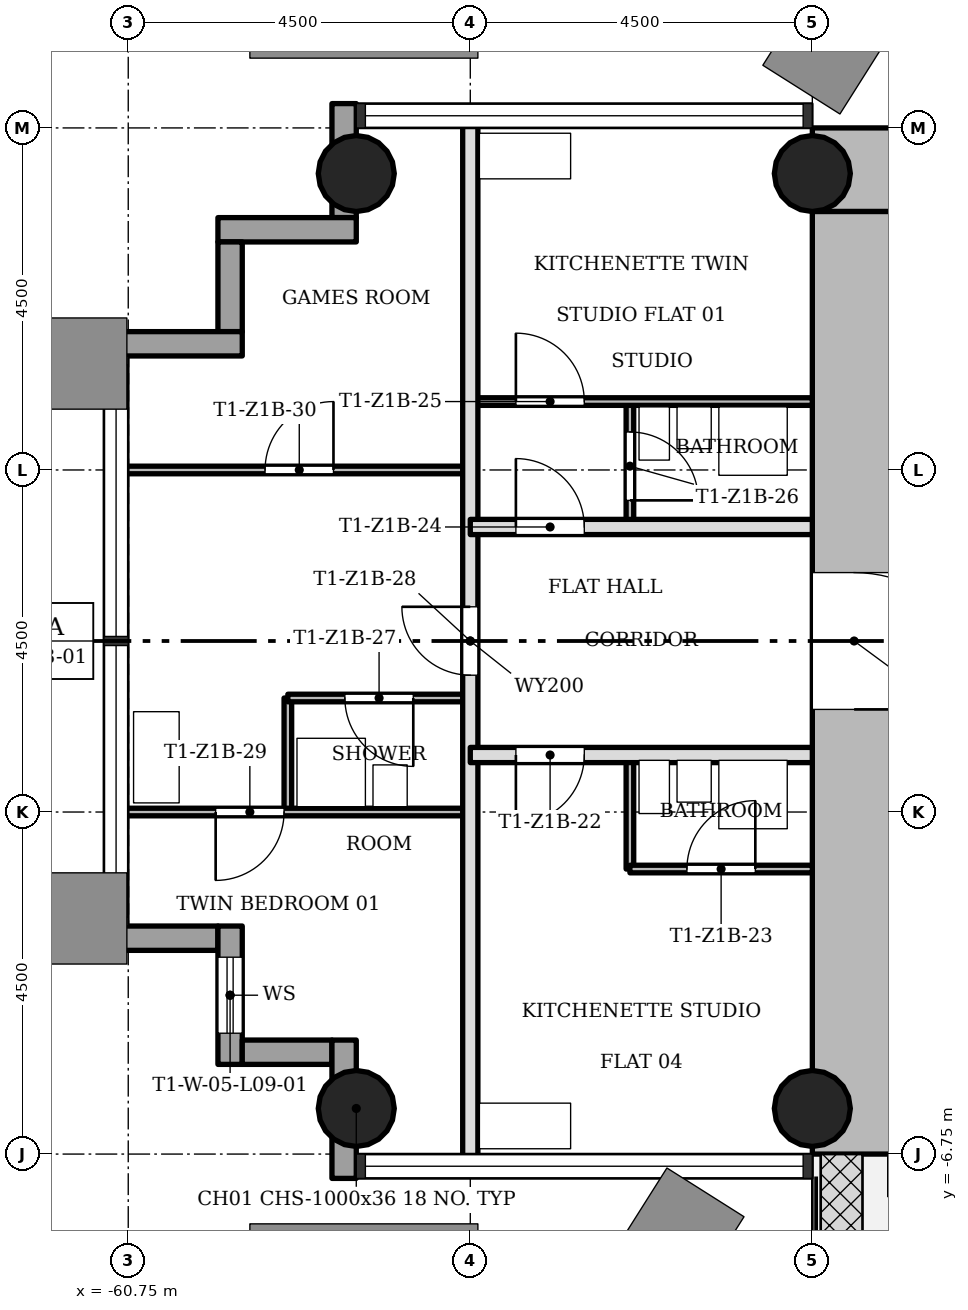
"""IFC4 building model, lengths in metres.
Left out: names, types, materials, properties, quantities, classifications, styles, units other than length and angle.
Written with IfcOpenShell. Run it as: python <this file> out.ifc"""

import sys

from ifc_helpers import new_model, si_unit, direction, frame, frame_2d, origin, origin_2d, place, context, subcontext, project, spatial, rectangle, hollow_circle, extrude, element, fill, save


model = new_model("IFC4")
c1 = context("Model", 3, precision=1e-05, world=origin(), true_north=direction((0.0, 1.0)))
c2 = subcontext(c1, "Body", "Model", "MODEL_VIEW")
j1 = project(units=[si_unit("LENGTHUNIT", "METRE"), si_unit("PLANEANGLEUNIT", "RADIAN")], contexts=[c1])
p1 = place(None, origin())
s1 = spatial("IfcSite", under=j1, at=p1, CompositionType="ELEMENT")
p2 = place(p1, origin())
s2 = spatial("IfcBuilding", under=s1, at=p2, CompositionType="ELEMENT")
p3 = place(p2, frame((0.0, 0.0, 38.1)))
s3 = spatial("IfcBuildingStorey", under=s2, at=p3, CompositionType="ELEMENT", Elevation=38.1)
p4 = place(p3, frame((-43.85, 6.2, 0.0), z_axis=(0.0, 0.0, 1.0), x_axis=(-1.0, 0.0, 0.0)))
e1 = element("IfcWall", 1, at=p4, inside=s3, PredefinedType="SHEAR", context=c2, shape_type="SweptSolid", body=[
    extrude(rectangle(XDim=7.9, YDim=1.1, at=frame_2d((3.95, 0.0))), origin(), (0.0, 0.0, 1.0), 3.4),
])
p5 = place(p3, frame((-51.2, 5.65, 0.0), z_axis=(0.0, 0.0, 1.0), x_axis=(0.0, -1.0, 0.0)))
e2 = element("IfcWall", 2, at=p5, inside=s3, PredefinedType="SHEAR", context=c2, shape_type="SweptSolid", body=[
    extrude(rectangle(XDim=12.4, YDim=1.1, at=frame_2d((6.2, 0.0))), origin(), (0.0, 0.0, 1.0), 3.4),
])
p6 = place(p5, frame((4.75, 0.0, 0.0)))
e3 = element("IfcOpeningElement", 3, at=p6, cuts=e2, PredefinedType="OPENING", context=c2, shape_type="SweptSolid", body=[
    extrude(rectangle(XDim=1.8, YDim=2.1, at=frame_2d((0.9, 1.05))), frame((0.0, 0.56, 0.0), z_axis=(0.0, -1.0, 0.0), x_axis=(1.0, 0.0, 0.0)), (0.0, 0.0, 1.0), 1.12),
])
for number, where, z_axis, x_axis in (
    (4, (-51.75, -6.15, 0.0), (0.0, 0.0, 1.0), (1.0, 0.0, 0.0)),
    (5, (-51.75, 6.15, 0.0), (0.0, 0.0, 1.0), (1.0, 0.0, 0.0)),
    (6, (-57.75, -6.15, 0.0), (0.0, 0.0, 1.0), (1.0, 0.0, 0.0)),
    (7, (-57.75, 6.15, 0.0), (0.0, 0.0, 1.0), (1.0, 0.0, 0.0)),
):
    element("IfcColumn", number, at=place(p3, frame(where, z_axis=z_axis, x_axis=x_axis)), inside=s3, PredefinedType="COLUMN", context=c2, shape_type="SweptSolid", body=[
        extrude(hollow_circle(Radius=0.5, WallThickness=0.036, at=origin_2d()), origin(), (0.0, 0.0, 1.0), 3.4),
    ])
p7 = place(p3, frame((-61.07, -3.91, -0.3), z_axis=(0.0, 0.0, 1.0), x_axis=(1.0, 0.0, 0.0)))
e8 = element("IfcWall", 8, at=p7, inside=s3, PredefinedType="STANDARD", context=c2, shape_type="SweptSolid", body=[
    extrude(rectangle(XDim=1.5, YDim=0.32, at=frame_2d((0.75, 0.0))), origin(), (0.0, 0.0, 1.0), 3.4),
])
p8 = place(p3, frame((-59.41, -3.75, -0.3), z_axis=(0.0, 0.0, 1.0), x_axis=(0.0, -1.0, 0.0)))
e9 = element("IfcWall", 9, at=p8, inside=s3, PredefinedType="STANDARD", context=c2, shape_type="SweptSolid", body=[
    extrude(rectangle(XDim=1.82, YDim=0.32, at=frame_2d((0.91, 0.0))), origin(), (0.0, 0.0, 1.0), 3.4),
])
p9 = place(p8, frame((0.41, 0.0, 1.2)))
e10 = element("IfcOpeningElement", 10, at=p9, cuts=e9, PredefinedType="OPENING", context=c2, shape_type="SweptSolid", body=[
    extrude(rectangle(XDim=1.0, YDim=1.5, at=frame_2d((0.5, 0.75))), frame((0.0, 0.17, 0.0), z_axis=(0.0, -1.0, 0.0), x_axis=(1.0, 0.0, 0.0)), (0.0, 0.0, 1.0), 0.34),
])
p10 = place(p3, frame((-59.25, -5.41, -0.3), z_axis=(0.0, 0.0, 1.0), x_axis=(1.0, 0.0, 0.0)))
e11 = element("IfcWall", 11, at=p10, inside=s3, PredefinedType="STANDARD", context=c2, shape_type="SweptSolid", body=[
    extrude(rectangle(XDim=1.18, YDim=0.32, at=frame_2d((0.59, 0.0))), origin(), (0.0, 0.0, 1.0), 3.4),
])
p11 = place(p3, frame((-57.91, -5.25, -0.3), z_axis=(0.0, 0.0, 1.0), x_axis=(0.0, -1.0, 0.0)))
e12 = element("IfcWall", 12, at=p11, inside=s3, PredefinedType="STANDARD", context=c2, shape_type="SweptSolid", body=[
    extrude(rectangle(XDim=1.82, YDim=0.32, at=frame_2d((0.91, 0.0))), origin(), (0.0, 0.0, 1.0), 3.4),
])
p12 = place(p3, frame((-57.91, 7.07, -0.3), z_axis=(0.0, 0.0, 1.0), x_axis=(0.0, -1.0, 0.0)))
e13 = element("IfcWall", 13, at=p12, inside=s3, PredefinedType="STANDARD", context=c2, shape_type="SweptSolid", body=[
    extrude(rectangle(XDim=1.5, YDim=0.32, at=frame_2d((0.75, 0.0))), origin(), (0.0, 0.0, 1.0), 3.4),
])
p13 = place(p3, frame((-57.75, 5.41, -0.3), z_axis=(0.0, 0.0, 1.0), x_axis=(-1.0, 0.0, 0.0)))
e14 = element("IfcWall", 14, at=p13, inside=s3, PredefinedType="STANDARD", context=c2, shape_type="SweptSolid", body=[
    extrude(rectangle(XDim=1.82, YDim=0.32, at=frame_2d((0.91, 0.0))), origin(), (0.0, 0.0, 1.0), 3.4),
])
p14 = place(p3, frame((-59.41, 5.25, -0.3), z_axis=(0.0, 0.0, 1.0), x_axis=(0.0, -1.0, 0.0)))
e15 = element("IfcWall", 15, at=p14, inside=s3, PredefinedType="STANDARD", context=c2, shape_type="SweptSolid", body=[
    extrude(rectangle(XDim=1.18, YDim=0.32, at=frame_2d((0.59, 0.0))), origin(), (0.0, 0.0, 1.0), 3.4),
])
p15 = place(p3, frame((-59.25, 3.91, -0.3), z_axis=(0.0, 0.0, 1.0), x_axis=(-1.0, 0.0, 0.0)))
e16 = element("IfcWall", 16, at=p15, inside=s3, PredefinedType="STANDARD", context=c2, shape_type="SweptSolid", body=[
    extrude(rectangle(XDim=1.82, YDim=0.32, at=frame_2d((0.91, 0.0))), origin(), (0.0, 0.0, 1.0), 3.4),
])
p16 = place(p3, frame((-58.65, -2.25, 0.0), z_axis=(0.0, 0.0, 1.0), x_axis=(0.0, 1.0, 0.0)))
e17 = element("IfcWall", 17, at=p16, inside=s3, PredefinedType="PARTITIONING", context=c2, shape_type="SweptSolid", body=[
    extrude(rectangle(XDim=1.5, YDim=0.1, at=frame_2d((0.75, 0.0))), origin(), (0.0, 0.0, 1.0), 3.0),
])
p17 = place(p3, frame((-56.25, -6.85, 0.0), z_axis=(0.0, 0.0, 1.0), x_axis=(0.0, 1.0, 0.0)))
e18 = element("IfcWall", 18, at=p17, inside=s3, PredefinedType="SOLIDWALL", context=c2, shape_type="SweptSolid", body=[
    extrude(rectangle(XDim=13.7, YDim=0.2, at=frame_2d((6.85, 0.0))), origin(), (0.0, 0.0, 1.0), 3.0),
])
p18 = place(p17, frame((6.4, 0.0, 0.0)))
e19 = element("IfcOpeningElement", 19, at=p18, cuts=e18, PredefinedType="OPENING", context=c2, shape_type="SweptSolid", body=[
    extrude(rectangle(XDim=0.9, YDim=2.1, at=frame_2d((0.45, 1.05))), frame((0.0, 0.11, 0.0), z_axis=(0.0, -1.0, 0.0), x_axis=(1.0, 0.0, 0.0)), (0.0, 0.0, 1.0), 0.22),
])
p19 = place(p3, frame((-54.15, -3.0, 0.0), z_axis=(0.0, 0.0, 1.0), x_axis=(0.0, 1.0, 0.0)))
e20 = element("IfcWall", 20, at=p19, inside=s3, PredefinedType="PARTITIONING", context=c2, shape_type="SweptSolid", body=[
    extrude(rectangle(XDim=1.5, YDim=0.1, at=frame_2d((0.75, 0.0))), origin(), (0.0, 0.0, 1.0), 3.0),
])
p20 = place(p3, frame((-54.15, 1.5, 0.0), z_axis=(0.0, 0.0, 1.0), x_axis=(0.0, 1.0, 0.0)))
e21 = element("IfcWall", 21, at=p20, inside=s3, PredefinedType="PARTITIONING", context=c2, shape_type="SweptSolid", body=[
    extrude(rectangle(XDim=1.65, YDim=0.1, at=frame_2d((0.825, 0.0))), origin(), (0.0, 0.0, 1.0), 3.0),
])
p21 = place(p20, frame((0.35, 0.0, 0.0)))
e22 = element("IfcOpeningElement", 22, at=p21, cuts=e21, PredefinedType="OPENING", context=c2, shape_type="SweptSolid", body=[
    extrude(rectangle(XDim=0.9, YDim=2.1, at=frame_2d((0.45, 1.05))), frame((0.0, 0.06, 0.0), z_axis=(0.0, -1.0, 0.0), x_axis=(1.0, 0.0, 0.0)), (0.0, 0.0, 1.0), 0.12),
])
p22 = place(p3, frame((-54.15, -3.0, 0.0), z_axis=(0.0, 0.0, 1.0), x_axis=(1.0, 0.0, 0.0)))
e23 = element("IfcWall", 23, at=p22, inside=s3, PredefinedType="PARTITIONING", context=c2, shape_type="SweptSolid", body=[
    extrude(rectangle(XDim=2.4, YDim=0.1, at=frame_2d((1.2, 0.0))), origin(), (0.0, 0.0, 1.0), 3.0),
])
p23 = place(p22, frame((0.75, 0.0, 0.0)))
e24 = element("IfcOpeningElement", 24, at=p23, cuts=e23, PredefinedType="OPENING", context=c2, shape_type="SweptSolid", body=[
    extrude(rectangle(XDim=0.9, YDim=2.1, at=frame_2d((0.45, 1.05))), frame((0.0, 0.06, 0.0), z_axis=(0.0, -1.0, 0.0), x_axis=(1.0, 0.0, 0.0)), (0.0, 0.0, 1.0), 0.12),
])
p24 = place(p3, frame((-60.85, -2.25, 0.0), z_axis=(0.0, 0.0, 1.0), x_axis=(1.0, 0.0, 0.0)))
e25 = element("IfcWall", 25, at=p24, inside=s3, PredefinedType="PARTITIONING", context=c2, shape_type="SweptSolid", body=[
    extrude(rectangle(XDim=4.6, YDim=0.1, at=frame_2d((2.3, 0.0))), origin(), (0.0, 0.0, 1.0), 3.0),
])
p25 = place(p24, frame((1.25, 0.0, 0.0)))
e26 = element("IfcOpeningElement", 26, at=p25, cuts=e25, PredefinedType="OPENING", context=c2, shape_type="SweptSolid", body=[
    extrude(rectangle(XDim=0.9, YDim=2.1, at=frame_2d((0.45, 1.05))), frame((0.0, 0.06, 0.0), z_axis=(0.0, -1.0, 0.0), x_axis=(1.0, 0.0, 0.0)), (0.0, 0.0, 1.0), 0.12),
])
p26 = place(p3, frame((-56.25, -1.5, 0.0), z_axis=(0.0, 0.0, 1.0), x_axis=(1.0, 0.0, 0.0)))
e27 = element("IfcWall", 27, at=p26, inside=s3, PredefinedType="SOLIDWALL", context=c2, shape_type="SweptSolid", body=[
    extrude(rectangle(XDim=4.5, YDim=0.2, at=frame_2d((2.25, 0.0))), origin(), (0.0, 0.0, 1.0), 3.0),
])
p27 = place(p26, frame((0.6, 0.0, 0.0)))
e28 = element("IfcOpeningElement", 28, at=p27, cuts=e27, PredefinedType="OPENING", context=c2, shape_type="SweptSolid", body=[
    extrude(rectangle(XDim=0.9, YDim=2.1, at=frame_2d((0.45, 1.05))), frame((0.0, 0.11, 0.0), z_axis=(0.0, -1.0, 0.0), x_axis=(1.0, 0.0, 0.0)), (0.0, 0.0, 1.0), 0.22),
])
p28 = place(p3, frame((-58.65, -0.75, 0.0), z_axis=(0.0, 0.0, 1.0), x_axis=(1.0, 0.0, 0.0)))
e29 = element("IfcWall", 29, at=p28, inside=s3, PredefinedType="PARTITIONING", context=c2, shape_type="SweptSolid", body=[
    extrude(rectangle(XDim=2.4, YDim=0.1, at=frame_2d((1.2, 0.0))), origin(), (0.0, 0.0, 1.0), 3.0),
])
p29 = place(p28, frame((0.75, 0.0, 0.0)))
e30 = element("IfcOpeningElement", 30, at=p29, cuts=e29, PredefinedType="OPENING", context=c2, shape_type="SweptSolid", body=[
    extrude(rectangle(XDim=0.9, YDim=2.1, at=frame_2d((0.45, 1.05))), frame((0.0, 0.06, 0.0), z_axis=(0.0, -1.0, 0.0), x_axis=(1.0, 0.0, 0.0)), (0.0, 0.0, 1.0), 0.12),
])
p30 = place(p3, frame((-56.25, 1.5, 0.0), z_axis=(0.0, 0.0, 1.0), x_axis=(1.0, 0.0, 0.0)))
e31 = element("IfcWall", 31, at=p30, inside=s3, PredefinedType="SOLIDWALL", context=c2, shape_type="SweptSolid", body=[
    extrude(rectangle(XDim=4.5, YDim=0.2, at=frame_2d((2.25, 0.0))), origin(), (0.0, 0.0, 1.0), 3.0),
])
p31 = place(p30, frame((0.6, 0.0, 0.0)))
e32 = element("IfcOpeningElement", 32, at=p31, cuts=e31, PredefinedType="OPENING", context=c2, shape_type="SweptSolid", body=[
    extrude(rectangle(XDim=0.9, YDim=2.1, at=frame_2d((0.45, 1.05))), frame((0.0, 0.11, 0.0), z_axis=(0.0, -1.0, 0.0), x_axis=(1.0, 0.0, 0.0)), (0.0, 0.0, 1.0), 0.22),
])
p32 = place(p3, frame((-60.85, 2.25, 0.0), z_axis=(0.0, 0.0, 1.0), x_axis=(1.0, 0.0, 0.0)))
e33 = element("IfcWall", 33, at=p32, inside=s3, PredefinedType="PARTITIONING", context=c2, shape_type="SweptSolid", body=[
    extrude(rectangle(XDim=4.6, YDim=0.1, at=frame_2d((2.3, 0.0))), origin(), (0.0, 0.0, 1.0), 3.0),
])
p33 = place(p32, frame((1.9, 0.0, 0.0)))
e34 = element("IfcOpeningElement", 34, at=p33, cuts=e33, PredefinedType="OPENING", context=c2, shape_type="SweptSolid", body=[
    extrude(rectangle(XDim=0.9, YDim=2.1, at=frame_2d((0.45, 1.05))), frame((0.0, 0.06, 0.0), z_axis=(0.0, -1.0, 0.0), x_axis=(1.0, 0.0, 0.0)), (0.0, 0.0, 1.0), 0.12),
])
p34 = place(p3, frame((-56.25, 3.15, 0.0), z_axis=(0.0, 0.0, 1.0), x_axis=(1.0, 0.0, 0.0)))
e35 = element("IfcWall", 35, at=p34, inside=s3, PredefinedType="PARTITIONING", context=c2, shape_type="SweptSolid", body=[
    extrude(rectangle(XDim=4.5, YDim=0.1, at=frame_2d((2.25, 0.0))), origin(), (0.0, 0.0, 1.0), 3.0),
])
p35 = place(p34, frame((0.6, 0.0, 0.0)))
e36 = element("IfcOpeningElement", 36, at=p35, cuts=e35, PredefinedType="OPENING", context=c2, shape_type="SweptSolid", body=[
    extrude(rectangle(XDim=0.9, YDim=2.1, at=frame_2d((0.45, 1.05))), frame((0.0, 0.06, 0.0), z_axis=(0.0, -1.0, 0.0), x_axis=(1.0, 0.0, 0.0)), (0.0, 0.0, 1.0), 0.12),
])
p36 = place(p27, origin())
e37 = element("IfcDoor", 37, at=p36, inside=s3, OperationType="SINGLE_SWING_LEFT", PredefinedType="DOOR", context=c2, shape_type="SweptSolid", body=[
    extrude(rectangle(XDim=0.9, YDim=2.1, at=frame_2d((0.45, 1.05))), frame((0.0, 0.025, 0.0), z_axis=(0.0, -1.0, 0.0), x_axis=(1.0, 0.0, 0.0)), (0.0, 0.0, 1.0), 0.05),
])
fill(e28, e37)
p37 = place(p23, origin())
e38 = element("IfcDoor", 38, at=p37, inside=s3, OperationType="SINGLE_SWING_LEFT", PredefinedType="DOOR", context=c2, shape_type="SweptSolid", body=[
    extrude(rectangle(XDim=0.9, YDim=2.1, at=frame_2d((0.45, 1.05))), frame((0.0, 0.025, 0.0), z_axis=(0.0, -1.0, 0.0), x_axis=(1.0, 0.0, 0.0)), (0.0, 0.0, 1.0), 0.05),
])
fill(e24, e38)
p38 = place(p31, origin())
e39 = element("IfcDoor", 39, at=p38, inside=s3, OperationType="SINGLE_SWING_RIGHT", PredefinedType="DOOR", context=c2, shape_type="SweptSolid", body=[
    extrude(rectangle(XDim=0.9, YDim=2.1, at=frame_2d((0.45, 1.05))), frame((0.0, 0.025, 0.0), z_axis=(0.0, -1.0, 0.0), x_axis=(1.0, 0.0, 0.0)), (0.0, 0.0, 1.0), 0.05),
])
fill(e32, e39)
p39 = place(p35, origin())
e40 = element("IfcDoor", 40, at=p39, inside=s3, OperationType="SINGLE_SWING_RIGHT", PredefinedType="DOOR", context=c2, shape_type="SweptSolid", body=[
    extrude(rectangle(XDim=0.9, YDim=2.1, at=frame_2d((0.45, 1.05))), frame((0.0, 0.025, 0.0), z_axis=(0.0, -1.0, 0.0), x_axis=(1.0, 0.0, 0.0)), (0.0, 0.0, 1.0), 0.05),
])
fill(e36, e40)
p40 = place(p21, origin())
e41 = element("IfcDoor", 41, at=p40, inside=s3, OperationType="SINGLE_SWING_LEFT", PredefinedType="DOOR", context=c2, shape_type="SweptSolid", body=[
    extrude(rectangle(XDim=0.9, YDim=2.1, at=frame_2d((0.45, 1.05))), frame((0.0, 0.025, 0.0), z_axis=(0.0, -1.0, 0.0), x_axis=(1.0, 0.0, 0.0)), (0.0, 0.0, 1.0), 0.05),
])
fill(e22, e41)
p41 = place(p29, origin())
e42 = element("IfcDoor", 42, at=p41, inside=s3, OperationType="SINGLE_SWING_RIGHT", PredefinedType="DOOR", context=c2, shape_type="SweptSolid", body=[
    extrude(rectangle(XDim=0.9, YDim=2.1, at=frame_2d((0.45, 1.05))), frame((0.0, 0.025, 0.0), z_axis=(0.0, -1.0, 0.0), x_axis=(1.0, 0.0, 0.0)), (0.0, 0.0, 1.0), 0.05),
])
fill(e30, e42)
p42 = place(p18, origin())
e43 = element("IfcDoor", 43, at=p42, inside=s3, OperationType="SINGLE_SWING_LEFT", PredefinedType="DOOR", context=c2, shape_type="SweptSolid", body=[
    extrude(rectangle(XDim=0.9, YDim=2.1, at=frame_2d((0.45, 1.05))), frame((0.0, 0.025, 0.0), z_axis=(0.0, -1.0, 0.0), x_axis=(1.0, 0.0, 0.0)), (0.0, 0.0, 1.0), 0.05),
])
fill(e19, e43)
p43 = place(p25, origin())
e44 = element("IfcDoor", 44, at=p43, inside=s3, OperationType="SINGLE_SWING_LEFT", PredefinedType="DOOR", context=c2, shape_type="SweptSolid", body=[
    extrude(rectangle(XDim=0.9, YDim=2.1, at=frame_2d((0.45, 1.05))), frame((0.0, 0.025, 0.0), z_axis=(0.0, -1.0, 0.0), x_axis=(1.0, 0.0, 0.0)), (0.0, 0.0, 1.0), 0.05),
])
fill(e26, e44)
p44 = place(p33, origin())
e45 = element("IfcDoor", 45, at=p44, inside=s3, OperationType="SINGLE_SWING_LEFT", PredefinedType="DOOR", context=c2, shape_type="SweptSolid", body=[
    extrude(rectangle(XDim=0.9, YDim=2.1, at=frame_2d((0.45, 1.05))), frame((0.0, 0.025, 0.0), z_axis=(0.0, -1.0, 0.0), x_axis=(1.0, 0.0, 0.0)), (0.0, 0.0, 1.0), 0.05),
])
fill(e34, e45)
p45 = place(p6, origin())
e46 = element("IfcDoor", 46, at=p45, inside=s3, OperationType="SINGLE_SWING_LEFT", PredefinedType="DOOR", context=c2, shape_type="SweptSolid", body=[
    extrude(rectangle(XDim=1.8, YDim=2.1, at=frame_2d((0.9, 1.05))), frame((0.0, 0.025, 0.0), z_axis=(0.0, -1.0, 0.0), x_axis=(1.0, 0.0, 0.0)), (0.0, 0.0, 1.0), 0.05),
])
fill(e3, e46)
p46 = place(p9, origin())
e47 = element("IfcWindow", 47, at=p46, inside=s3, PartitioningType="SINGLE_PANEL", PredefinedType="WINDOW", context=c2, shape_type="SweptSolid", body=[
    extrude(rectangle(XDim=1.0, YDim=1.5, at=frame_2d((0.5, 0.75))), frame((0.0, 0.03, 0.0), z_axis=(0.0, -1.0, 0.0), x_axis=(1.0, 0.0, 0.0)), (0.0, 0.0, 1.0), 0.06),
])
fill(e10, e47)
save(model, sys.argv[1])
